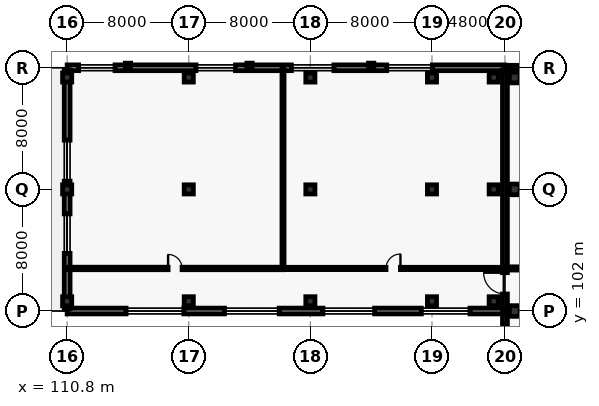
"""IFC4 building model, lengths in metres.
Left out: names, types, materials, properties, quantities, classifications, styles, units other than length and angle.
Written with IfcOpenShell. Run it as: python <this file> out.ifc"""

import sys

from ifc_helpers import new_model, si_unit, direction, frame, frame_2d, origin, origin_2d, place, context, subcontext, project, spatial, rectangle, extrude, element, fill, save


model = new_model("IFC4")
c1 = context("Model", 3, precision=1e-05, world=origin(), true_north=direction((0.0, 1.0)))
c2 = subcontext(c1, "Body", "Model", "MODEL_VIEW")
j1 = project(units=[si_unit("LENGTHUNIT", "METRE"), si_unit("PLANEANGLEUNIT", "RADIAN")], contexts=[c1])
p1 = place(None, origin())
s1 = spatial("IfcSite", under=j1, at=p1, CompositionType="ELEMENT")
p2 = place(p1, origin())
s2 = spatial("IfcBuilding", under=s1, at=p2, CompositionType="ELEMENT")
p3 = place(p2, frame((0.0, 0.0, 15.6)))
s3 = spatial("IfcBuildingStorey", under=s2, at=p3, CompositionType="ELEMENT", Elevation=15.6)
for number, where, z_axis, x_axis in (
    (1, (110.8, 102.64, 0.0), (0.0, 0.0, 1.0), (1.0, 0.0, 0.0)),
    (2, (110.8, 110.0, 0.0), (0.0, 0.0, 1.0), (1.0, 0.0, 0.0)),
    (3, (110.8, 117.36, 0.0), (0.0, 0.0, 1.0), (1.0, 0.0, 0.0)),
    (4, (118.8, 102.64, 0.0), (0.0, 0.0, 1.0), (1.0, 0.0, 0.0)),
    (5, (118.8, 110.0, 0.0), (0.0, 0.0, 1.0), (1.0, 0.0, 0.0)),
    (6, (118.8, 117.36, 0.0), (0.0, 0.0, 1.0), (1.0, 0.0, 0.0)),
    (7, (126.8, 102.64, 0.0), (0.0, 0.0, 1.0), (1.0, 0.0, 0.0)),
    (8, (126.8, 110.0, 0.0), (0.0, 0.0, 1.0), (1.0, 0.0, 0.0)),
    (9, (126.8, 117.36, 0.0), (0.0, 0.0, 1.0), (1.0, 0.0, 0.0)),
    (10, (134.8, 102.64, 0.0), (0.0, 0.0, 1.0), (1.0, 0.0, 0.0)),
    (11, (134.8, 110.0, 0.0), (0.0, 0.0, 1.0), (1.0, 0.0, 0.0)),
    (12, (134.8, 117.36, 0.0), (0.0, 0.0, 1.0), (1.0, 0.0, 0.0)),
    (13, (138.86, 102.64, 0.0), (0.0, 0.0, 1.0), (1.0, 0.0, 0.0)),
    (14, (138.86, 110.0, 0.0), (0.0, 0.0, 1.0), (1.0, 0.0, 0.0)),
    (15, (138.86, 117.36, 0.0), (0.0, 0.0, 1.0), (1.0, 0.0, 0.0)),
):
    element("IfcColumn", number, at=place(p3, frame(where, z_axis=z_axis, x_axis=x_axis)), inside=s3, PredefinedType="COLUMN", context=c2, shape_type="SweptSolid", body=[
        extrude(rectangle(XDim=0.6, YDim=0.6, at=origin_2d()), origin(), (0.0, 0.0, 1.0), 4.8),
    ])
for number, where, z_axis, x_axis in (
    (16, (140.24, 102.0, 0.0), (0.0, 0.0, 1.0), (1.0, 0.0, 0.0)),
    (17, (140.24, 110.0, 0.0), (0.0, 0.0, 1.0), (1.0, 0.0, 0.0)),
    (18, (140.24, 117.36, 0.0), (0.0, 0.0, 1.0), (1.0, 0.0, 0.0)),
):
    element("IfcColumn", number, at=place(p3, frame(where, z_axis=z_axis, x_axis=x_axis)), inside=s3, PredefinedType="COLUMN", context=c2, shape_type="SweptSolid", body=[
        extrude(rectangle(XDim=0.7, YDim=0.7, at=origin_2d()), origin(), (0.0, 0.0, 1.0), 4.8),
    ])
for number, where, z_axis, x_axis in (
    (19, (114.8, 118.08, 0.0), (0.0, 0.0, 1.0), (0.0, 1.0, 0.0)),
    (20, (122.8, 118.08, 0.0), (0.0, 0.0, 1.0), (0.0, 1.0, 0.0)),
    (21, (130.8, 118.08, 0.0), (0.0, 0.0, 1.0), (0.0, 1.0, 0.0)),
):
    element("IfcColumn", number, at=place(p3, frame(where, z_axis=z_axis, x_axis=x_axis)), inside=s3, PredefinedType="PILASTER", context=c2, shape_type="SweptSolid", body=[
        extrude(rectangle(XDim=0.35, YDim=0.45, at=origin_2d()), origin(), (0.0, 0.0, 1.0), 4.8),
    ])
p4 = place(p3, frame((110.8, 118.0, 0.0), z_axis=(0.0, 0.0, 1.0), x_axis=(1.0, 0.0, 0.0)))
e22 = element("IfcWall", 22, at=p4, inside=s3, PredefinedType="SOLIDWALL", context=c2, shape_type="SweptSolid", body=[
    extrude(rectangle(XDim=28.795, YDim=0.38, at=frame_2d((14.397, 0.0))), origin(), (0.0, 0.0, 1.0), 4.555),
])
p5 = place(p4, frame((0.75, 0.0, 0.9)))
e23 = element("IfcOpeningElement", 23, at=p5, cuts=e22, PredefinedType="OPENING", context=c2, shape_type="SweptSolid", body=[
    extrude(rectangle(XDim=2.4, YDim=1.75, at=frame_2d((1.2, 0.875))), frame((0.0, 0.2, 0.0), z_axis=(0.0, -1.0, 0.0), x_axis=(1.0, 0.0, 0.0)), (0.0, 0.0, 1.0), 0.4),
])
p6 = place(p4, frame((8.475, 0.0, 0.9)))
e24 = element("IfcOpeningElement", 24, at=p6, cuts=e22, PredefinedType="OPENING", context=c2, shape_type="SweptSolid", body=[
    extrude(rectangle(XDim=2.6, YDim=1.75, at=frame_2d((1.3, 0.875))), frame((0.0, 0.2, 0.0), z_axis=(0.0, -1.0, 0.0), x_axis=(1.0, 0.0, 0.0)), (0.0, 0.0, 1.0), 0.4),
])
p7 = place(p4, frame((14.75, 0.0, 0.9)))
e25 = element("IfcOpeningElement", 25, at=p7, cuts=e22, PredefinedType="OPENING", context=c2, shape_type="SweptSolid", body=[
    extrude(rectangle(XDim=2.8, YDim=1.8, at=frame_2d((1.4, 0.9))), frame((0.0, 0.2, 0.0), z_axis=(0.0, -1.0, 0.0), x_axis=(1.0, 0.0, 0.0)), (0.0, 0.0, 1.0), 0.4),
])
p8 = place(p4, frame((21.025, 0.0, 0.9)))
e26 = element("IfcOpeningElement", 26, at=p8, cuts=e22, PredefinedType="OPENING", context=c2, shape_type="SweptSolid", body=[
    extrude(rectangle(XDim=3.0, YDim=1.8, at=frame_2d((1.5, 0.9))), frame((0.0, 0.2, 0.0), z_axis=(0.0, -1.0, 0.0), x_axis=(1.0, 0.0, 0.0)), (0.0, 0.0, 1.0), 0.4),
])
p9 = place(p3, frame((139.5, 102.0, 0.0), z_axis=(0.0, 0.0, 1.0), x_axis=(-1.0, 0.0, 0.0)))
e27 = element("IfcWall", 27, at=p9, inside=s3, PredefinedType="SOLIDWALL", context=c2, shape_type="SweptSolid", body=[
    extrude(rectangle(XDim=28.7, YDim=0.38, at=frame_2d((14.35, 0.0))), origin(), (0.0, 0.0, 1.0), 4.555),
])
p10 = place(p9, frame((2.2, 0.0, 0.9)))
e28 = element("IfcOpeningElement", 28, at=p10, cuts=e27, PredefinedType="OPENING", context=c2, shape_type="SweptSolid", body=[
    extrude(rectangle(XDim=3.2, YDim=1.85, at=frame_2d((1.6, 0.925))), frame((0.0, 0.2, 0.0), z_axis=(0.0, -1.0, 0.0), x_axis=(1.0, 0.0, 0.0)), (0.0, 0.0, 1.0), 0.4),
])
p11 = place(p9, frame((8.475, 0.0, 0.9)))
e29 = element("IfcOpeningElement", 29, at=p11, cuts=e27, PredefinedType="OPENING", context=c2, shape_type="SweptSolid", body=[
    extrude(rectangle(XDim=3.4, YDim=1.85, at=frame_2d((1.7, 0.925))), frame((0.0, 0.2, 0.0), z_axis=(0.0, -1.0, 0.0), x_axis=(1.0, 0.0, 0.0)), (0.0, 0.0, 1.0), 0.4),
])
p12 = place(p9, frame((14.75, 0.0, 0.9)))
e30 = element("IfcOpeningElement", 30, at=p12, cuts=e27, PredefinedType="OPENING", context=c2, shape_type="SweptSolid", body=[
    extrude(rectangle(XDim=3.6, YDim=1.9, at=frame_2d((1.8, 0.95))), frame((0.0, 0.2, 0.0), z_axis=(0.0, -1.0, 0.0), x_axis=(1.0, 0.0, 0.0)), (0.0, 0.0, 1.0), 0.4),
])
p13 = place(p9, frame((21.025, 0.0, 0.9)))
e31 = element("IfcOpeningElement", 31, at=p13, cuts=e27, PredefinedType="OPENING", context=c2, shape_type="SweptSolid", body=[
    extrude(rectangle(XDim=3.8, YDim=1.9, at=frame_2d((1.9, 0.95))), frame((0.0, 0.2, 0.0), z_axis=(0.0, -1.0, 0.0), x_axis=(1.0, 0.0, 0.0)), (0.0, 0.0, 1.0), 0.4),
])
p14 = place(p3, frame((110.8, 102.14, 0.0), z_axis=(0.0, 0.0, 1.0), x_axis=(0.0, 1.0, 0.0)))
e32 = element("IfcWall", 32, at=p14, inside=s3, PredefinedType="SOLIDWALL", context=c2, shape_type="SweptSolid", body=[
    extrude(rectangle(XDim=15.72, YDim=0.38, at=frame_2d((7.86, 0.0))), origin(), (0.0, 0.0, 1.0), 3.805),
])
p15 = place(p14, frame((3.65, 0.0, 0.9)))
e33 = element("IfcOpeningElement", 33, at=p15, cuts=e32, PredefinedType="OPENING", context=c2, shape_type="SweptSolid", body=[
    extrude(rectangle(XDim=2.6, YDim=2.35, at=frame_2d((1.3, 1.175))), frame((0.0, 0.2, 0.0), z_axis=(0.0, -1.0, 0.0), x_axis=(1.0, 0.0, 0.0)), (0.0, 0.0, 1.0), 0.4),
])
p16 = place(p14, frame((8.4, 0.0, 0.9)))
e34 = element("IfcOpeningElement", 34, at=p16, cuts=e32, PredefinedType="OPENING", context=c2, shape_type="SweptSolid", body=[
    extrude(rectangle(XDim=2.7, YDim=2.35, at=frame_2d((1.35, 1.175))), frame((0.0, 0.2, 0.0), z_axis=(0.0, -1.0, 0.0), x_axis=(1.0, 0.0, 0.0)), (0.0, 0.0, 1.0), 0.4),
])
p17 = place(p3, frame((139.6, 118.0, 0.0), z_axis=(0.0, 0.0, 1.0), x_axis=(1.0, 0.0, 0.0)))
e35 = element("IfcWall", 35, at=p17, inside=s3, PredefinedType="SOLIDWALL", context=c2, shape_type="SweptSolid", body=[
    extrude(rectangle(XDim=32.4, YDim=0.32, at=frame_2d((16.2, 0.0))), origin(), (0.0, 0.0, 1.0), 4.58),
])
p18 = place(p17, frame((2.2, 0.0, 0.9)))
e36 = element("IfcOpeningElement", 36, at=p18, cuts=e35, PredefinedType="OPENING", context=c2, shape_type="SweptSolid", body=[
    extrude(rectangle(XDim=2.6, YDim=1.75, at=frame_2d((1.3, 0.875))), frame((0.0, 0.17, 0.0), z_axis=(0.0, -1.0, 0.0), x_axis=(1.0, 0.0, 0.0)), (0.0, 0.0, 1.0), 0.34),
])
p19 = place(p17, frame((7.96, 0.0, 0.9)))
e37 = element("IfcOpeningElement", 37, at=p19, cuts=e35, PredefinedType="OPENING", context=c2, shape_type="SweptSolid", body=[
    extrude(rectangle(XDim=2.8, YDim=1.8, at=frame_2d((1.4, 0.9))), frame((0.0, 0.17, 0.0), z_axis=(0.0, -1.0, 0.0), x_axis=(1.0, 0.0, 0.0)), (0.0, 0.0, 1.0), 0.34),
])
p20 = place(p17, frame((12.97, 0.0, 0.9)))
e38 = element("IfcOpeningElement", 38, at=p20, cuts=e35, PredefinedType="OPENING", context=c2, shape_type="SweptSolid", body=[
    extrude(rectangle(XDim=3.0, YDim=1.8, at=frame_2d((1.5, 0.9))), frame((0.0, 0.17, 0.0), z_axis=(0.0, -1.0, 0.0), x_axis=(1.0, 0.0, 0.0)), (0.0, 0.0, 1.0), 0.34),
])
p21 = place(p17, frame((19.48, 0.0, 0.9)))
e39 = element("IfcOpeningElement", 39, at=p21, cuts=e35, PredefinedType="OPENING", context=c2, shape_type="SweptSolid", body=[
    extrude(rectangle(XDim=1.6, YDim=1.65, at=frame_2d((0.8, 0.825))), frame((0.0, 0.17, 0.0), z_axis=(0.0, -1.0, 0.0), x_axis=(1.0, 0.0, 0.0)), (0.0, 0.0, 1.0), 0.34),
])
p22 = place(p3, frame((139.6, 71.74, 0.0), z_axis=(0.0, 0.0, 1.0), x_axis=(0.0, 1.0, 0.0)))
e40 = element("IfcWall", 40, at=p22, inside=s3, PredefinedType="SOLIDWALL", context=c2, shape_type="SweptSolid", body=[
    extrude(rectangle(XDim=46.12, YDim=0.32, at=frame_2d((23.06, 0.0))), origin(), (0.0, 0.0, 1.0), 4.58),
])
p23 = place(p22, frame((31.38, 0.0, 0.0)))
e41 = element("IfcOpeningElement", 41, at=p23, cuts=e40, PredefinedType="OPENING", context=c2, shape_type="SweptSolid", body=[
    extrude(rectangle(XDim=1.4, YDim=2.25, at=frame_2d((0.7, 1.125))), frame((0.0, 0.17, 0.0), z_axis=(0.0, -1.0, 0.0), x_axis=(1.0, 0.0, 0.0)), (0.0, 0.0, 1.0), 0.34),
])
p24 = place(p3, frame((110.8, 104.8, 0.0), z_axis=(0.0, 0.0, 1.0), x_axis=(1.0, 0.0, 0.0)))
e42 = element("IfcWall", 42, at=p24, inside=s3, PredefinedType="PARTITIONING", context=c2, shape_type="SweptSolid", body=[
    extrude(rectangle(XDim=14.2, YDim=0.165, at=frame_2d((7.1, 0.0))), origin(), (0.0, 0.0, 1.0), 4.555),
])
p25 = place(p24, frame((6.64, 0.0, 0.0)))
e43 = element("IfcOpeningElement", 43, at=p25, cuts=e42, PredefinedType="OPENING", context=c2, shape_type="SweptSolid", body=[
    extrude(rectangle(XDim=0.92, YDim=2.1, at=frame_2d((0.46, 1.05))), frame((0.0, 0.093, 0.0), z_axis=(0.0, -1.0, 0.0), x_axis=(1.0, 0.0, 0.0)), (0.0, 0.0, 1.0), 0.185),
])
p26 = place(p3, frame((125.0, 104.8, 0.0), z_axis=(0.0, 0.0, 1.0), x_axis=(1.0, 0.0, 0.0)))
e44 = element("IfcWall", 44, at=p26, inside=s3, PredefinedType="PARTITIONING", context=c2, shape_type="SweptSolid", body=[
    extrude(rectangle(XDim=14.5, YDim=0.15, at=frame_2d((7.25, 0.0))), origin(), (0.0, 0.0, 1.0), 4.555),
])
p27 = place(p26, frame((6.775, 0.0, 0.0)))
e45 = element("IfcOpeningElement", 45, at=p27, cuts=e44, PredefinedType="OPENING", context=c2, shape_type="SweptSolid", body=[
    extrude(rectangle(XDim=0.95, YDim=2.1, at=frame_2d((0.475, 1.05))), frame((0.0, 0.085, 0.0), z_axis=(0.0, -1.0, 0.0), x_axis=(1.0, 0.0, 0.0)), (0.0, 0.0, 1.0), 0.17),
])
p28 = place(p3, frame((125.0, 118.0, 0.0), z_axis=(0.0, 0.0, 1.0), x_axis=(0.0, -1.0, 0.0)))
e46 = element("IfcWall", 46, at=p28, inside=s3, PredefinedType="PARTITIONING", context=c2, shape_type="SweptSolid", body=[
    extrude(rectangle(XDim=13.2, YDim=0.135, at=frame_2d((6.6, 0.0))), origin(), (0.0, 0.0, 1.0), 4.555),
])
p29 = place(p3, frame((157.4, 102.0, 0.0), z_axis=(0.0, 0.0, 1.0), x_axis=(-1.0, 0.0, 0.0)))
e47 = element("IfcWall", 47, at=p29, inside=s3, PredefinedType="PARTITIONING", context=c2, shape_type="SweptSolid", body=[
    extrude(rectangle(XDim=17.8, YDim=0.24, at=frame_2d((8.9, 0.0))), origin(), (0.0, 0.0, 1.0), 3.93),
])
p30 = place(p29, frame((8.05, 0.0, 0.0)))
e48 = element("IfcOpeningElement", 48, at=p30, cuts=e47, PredefinedType="OPENING", context=c2, shape_type="SweptSolid", body=[
    extrude(rectangle(XDim=1.7, YDim=2.3, at=frame_2d((0.85, 1.15))), frame((0.0, 0.13, 0.0), z_axis=(0.0, -1.0, 0.0), x_axis=(1.0, 0.0, 0.0)), (0.0, 0.0, 1.0), 0.26),
])
p31 = place(p29, frame((13.184, 0.0, 0.0)))
e49 = element("IfcOpeningElement", 49, at=p31, cuts=e47, PredefinedType="OPENING", context=c2, shape_type="SweptSolid", body=[
    extrude(rectangle(XDim=1.4, YDim=2.25, at=frame_2d((0.7, 1.125))), frame((0.0, 0.13, 0.0), z_axis=(0.0, -1.0, 0.0), x_axis=(1.0, 0.0, 0.0)), (0.0, 0.0, 1.0), 0.26),
])
p32 = place(p3, frame((139.6, 104.8, 0.0), z_axis=(0.0, 0.0, 1.0), x_axis=(1.0, 0.0, 0.0)))
e50 = element("IfcWall", 50, at=p32, inside=s3, PredefinedType="PARTITIONING", context=c2, shape_type="SweptSolid", body=[
    extrude(rectangle(XDim=17.8, YDim=0.21, at=frame_2d((8.9, 0.0))), origin(), (0.0, 0.0, 1.0), 4.58),
])
p33 = place(p32, frame((8.39, 0.0, 0.0)))
e51 = element("IfcOpeningElement", 51, at=p33, cuts=e50, PredefinedType="OPENING", context=c2, shape_type="SweptSolid", body=[
    extrude(rectangle(XDim=1.02, YDim=2.1, at=frame_2d((0.51, 1.05))), frame((0.0, 0.115, 0.0), z_axis=(0.0, -1.0, 0.0), x_axis=(1.0, 0.0, 0.0)), (0.0, 0.0, 1.0), 0.23),
])
p34 = place(p32, frame((13.184, 0.0, 0.0)))
e52 = element("IfcOpeningElement", 52, at=p34, cuts=e50, PredefinedType="OPENING", context=c2, shape_type="SweptSolid", body=[
    extrude(rectangle(XDim=1.4, YDim=2.25, at=frame_2d((0.7, 1.125))), frame((0.0, 0.115, 0.0), z_axis=(0.0, -1.0, 0.0), x_axis=(1.0, 0.0, 0.0)), (0.0, 0.0, 1.0), 0.23),
])
p35 = place(p5, origin())
e53 = element("IfcWindow", 53, at=p35, inside=s3, PartitioningType="SINGLE_PANEL", PredefinedType="WINDOW", context=c2, shape_type="SweptSolid", body=[
    extrude(rectangle(XDim=2.4, YDim=1.75, at=frame_2d((1.2, 0.875))), frame((0.0, 0.03, 0.0), z_axis=(0.0, -1.0, 0.0), x_axis=(1.0, 0.0, 0.0)), (0.0, 0.0, 1.0), 0.06),
])
fill(e23, e53)
p36 = place(p6, origin())
e54 = element("IfcWindow", 54, at=p36, inside=s3, PartitioningType="SINGLE_PANEL", PredefinedType="WINDOW", context=c2, shape_type="SweptSolid", body=[
    extrude(rectangle(XDim=2.6, YDim=1.75, at=frame_2d((1.3, 0.875))), frame((0.0, 0.03, 0.0), z_axis=(0.0, -1.0, 0.0), x_axis=(1.0, 0.0, 0.0)), (0.0, 0.0, 1.0), 0.06),
])
fill(e24, e54)
p37 = place(p7, origin())
e55 = element("IfcWindow", 55, at=p37, inside=s3, PartitioningType="SINGLE_PANEL", PredefinedType="WINDOW", context=c2, shape_type="SweptSolid", body=[
    extrude(rectangle(XDim=2.8, YDim=1.8, at=frame_2d((1.4, 0.9))), frame((0.0, 0.03, 0.0), z_axis=(0.0, -1.0, 0.0), x_axis=(1.0, 0.0, 0.0)), (0.0, 0.0, 1.0), 0.06),
])
fill(e25, e55)
p38 = place(p8, origin())
e56 = element("IfcWindow", 56, at=p38, inside=s3, PartitioningType="SINGLE_PANEL", PredefinedType="WINDOW", context=c2, shape_type="SweptSolid", body=[
    extrude(rectangle(XDim=3.0, YDim=1.8, at=frame_2d((1.5, 0.9))), frame((0.0, 0.03, 0.0), z_axis=(0.0, -1.0, 0.0), x_axis=(1.0, 0.0, 0.0)), (0.0, 0.0, 1.0), 0.06),
])
fill(e26, e56)
p39 = place(p10, origin())
e57 = element("IfcWindow", 57, at=p39, inside=s3, PartitioningType="SINGLE_PANEL", PredefinedType="WINDOW", context=c2, shape_type="SweptSolid", body=[
    extrude(rectangle(XDim=3.2, YDim=1.85, at=frame_2d((1.6, 0.925))), frame((0.0, 0.03, 0.0), z_axis=(0.0, -1.0, 0.0), x_axis=(1.0, 0.0, 0.0)), (0.0, 0.0, 1.0), 0.06),
])
fill(e28, e57)
p40 = place(p11, origin())
e58 = element("IfcWindow", 58, at=p40, inside=s3, PartitioningType="SINGLE_PANEL", PredefinedType="WINDOW", context=c2, shape_type="SweptSolid", body=[
    extrude(rectangle(XDim=3.4, YDim=1.85, at=frame_2d((1.7, 0.925))), frame((0.0, 0.03, 0.0), z_axis=(0.0, -1.0, 0.0), x_axis=(1.0, 0.0, 0.0)), (0.0, 0.0, 1.0), 0.06),
])
fill(e29, e58)
p41 = place(p12, origin())
e59 = element("IfcWindow", 59, at=p41, inside=s3, PartitioningType="SINGLE_PANEL", PredefinedType="WINDOW", context=c2, shape_type="SweptSolid", body=[
    extrude(rectangle(XDim=3.6, YDim=1.9, at=frame_2d((1.8, 0.95))), frame((0.0, 0.03, 0.0), z_axis=(0.0, -1.0, 0.0), x_axis=(1.0, 0.0, 0.0)), (0.0, 0.0, 1.0), 0.06),
])
fill(e30, e59)
p42 = place(p13, origin())
e60 = element("IfcWindow", 60, at=p42, inside=s3, PartitioningType="SINGLE_PANEL", PredefinedType="WINDOW", context=c2, shape_type="SweptSolid", body=[
    extrude(rectangle(XDim=3.8, YDim=1.9, at=frame_2d((1.9, 0.95))), frame((0.0, 0.03, 0.0), z_axis=(0.0, -1.0, 0.0), x_axis=(1.0, 0.0, 0.0)), (0.0, 0.0, 1.0), 0.06),
])
fill(e31, e60)
p43 = place(p15, origin())
e61 = element("IfcWindow", 61, at=p43, inside=s3, PartitioningType="SINGLE_PANEL", PredefinedType="WINDOW", context=c2, shape_type="SweptSolid", body=[
    extrude(rectangle(XDim=2.6, YDim=2.35, at=frame_2d((1.3, 1.175))), frame((0.0, 0.03, 0.0), z_axis=(0.0, -1.0, 0.0), x_axis=(1.0, 0.0, 0.0)), (0.0, 0.0, 1.0), 0.06),
])
fill(e33, e61)
p44 = place(p16, origin())
e62 = element("IfcWindow", 62, at=p44, inside=s3, PartitioningType="SINGLE_PANEL", PredefinedType="WINDOW", context=c2, shape_type="SweptSolid", body=[
    extrude(rectangle(XDim=2.7, YDim=2.35, at=frame_2d((1.35, 1.175))), frame((0.0, 0.03, 0.0), z_axis=(0.0, -1.0, 0.0), x_axis=(1.0, 0.0, 0.0)), (0.0, 0.0, 1.0), 0.06),
])
fill(e34, e62)
p45 = place(p23, origin())
e63 = element("IfcDoor", 63, at=p45, inside=s3, OperationType="SINGLE_SWING_RIGHT", PredefinedType="DOOR", context=c2, shape_type="SweptSolid", body=[
    extrude(rectangle(XDim=1.4, YDim=2.25, at=frame_2d((0.7, 1.125))), frame((0.0, 0.025, 0.0), z_axis=(0.0, -1.0, 0.0), x_axis=(1.0, 0.0, 0.0)), (0.0, 0.0, 1.0), 0.05),
])
fill(e41, e63)
p46 = place(p25, origin())
e64 = element("IfcDoor", 64, at=p46, inside=s3, OperationType="SINGLE_SWING_LEFT", PredefinedType="DOOR", context=c2, shape_type="SweptSolid", body=[
    extrude(rectangle(XDim=0.92, YDim=2.1, at=frame_2d((0.46, 1.05))), frame((0.0, 0.025, 0.0), z_axis=(0.0, -1.0, 0.0), x_axis=(1.0, 0.0, 0.0)), (0.0, 0.0, 1.0), 0.05),
])
fill(e43, e64)
p47 = place(p27, origin())
e65 = element("IfcDoor", 65, at=p47, inside=s3, OperationType="SINGLE_SWING_RIGHT", PredefinedType="DOOR", context=c2, shape_type="SweptSolid", body=[
    extrude(rectangle(XDim=0.95, YDim=2.1, at=frame_2d((0.475, 1.05))), frame((0.0, 0.025, 0.0), z_axis=(0.0, -1.0, 0.0), x_axis=(1.0, 0.0, 0.0)), (0.0, 0.0, 1.0), 0.05),
])
fill(e45, e65)
save(model, sys.argv[1])
